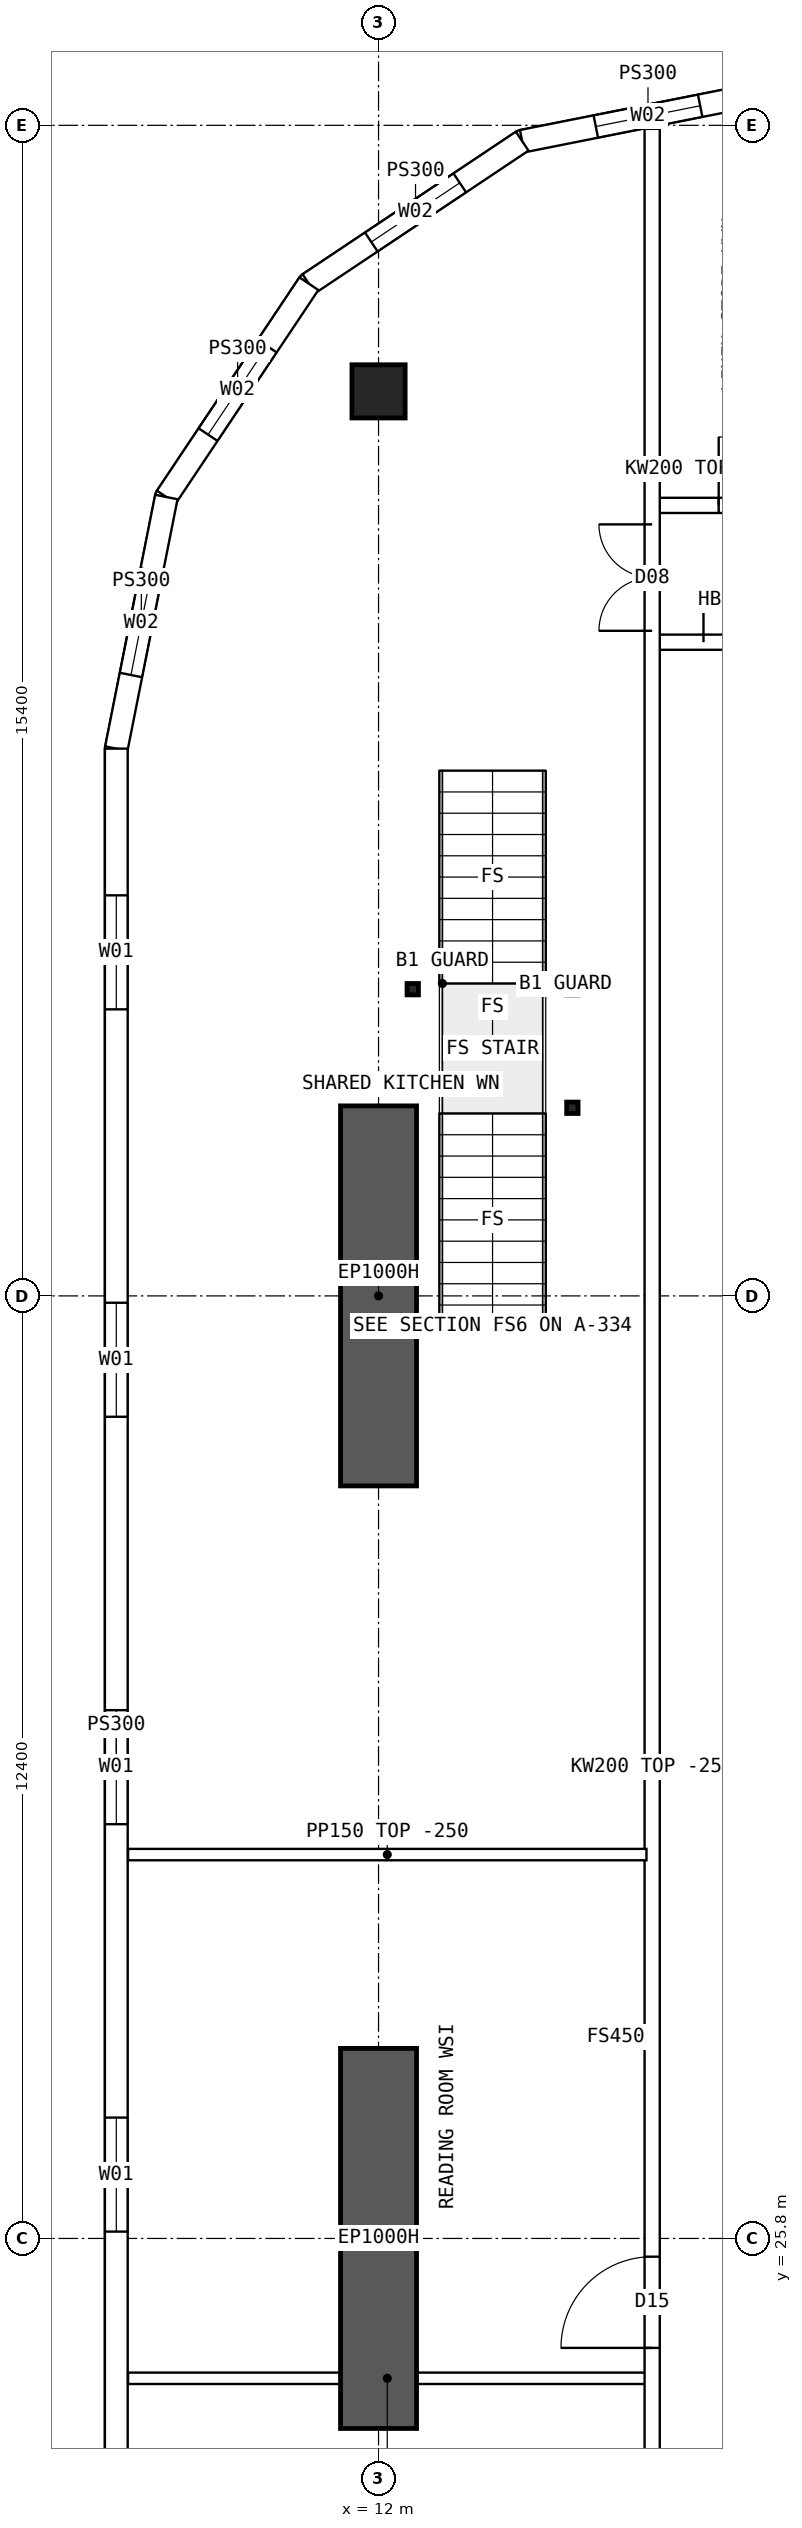
"""IFC4 building model, lengths in metres.
Left out: names, types, materials, properties, quantities, classifications, styles, units other than length and angle.
Written with IfcOpenShell. Run it as: python <this file> out.ifc"""

import sys

from ifc_helpers import new_model, si_unit, direction, frame, frame_2d, origin, origin_2d, place, context, subcontext, project, spatial, polyline, rectangle, hollow_rectangle, outline, extrude, element, fill, save


model = new_model("IFC4")
c1 = context("Model", 3, precision=1e-05, world=origin(), true_north=direction((0.0, 1.0)))
c2 = subcontext(c1, "Body", "Model", "MODEL_VIEW")
j1 = project(units=[si_unit("LENGTHUNIT", "METRE"), si_unit("PLANEANGLEUNIT", "RADIAN")], contexts=[c1])
p1 = place(None, origin())
s1 = spatial("IfcSite", under=j1, at=p1, CompositionType="ELEMENT")
p2 = place(p1, origin())
s2 = spatial("IfcBuilding", under=s1, at=p2, CompositionType="ELEMENT")
p3 = place(p2, frame((0.0, 0.0, 163.6)))
s3 = spatial("IfcBuildingStorey", under=s2, at=p3, CompositionType="ELEMENT", Elevation=163.6)
p4 = place(p3, frame((12.0, 50.1, 0.0), z_axis=(0.0, 0.0, 1.0), x_axis=(1.0, 0.0, 0.0)))
e1 = element("IfcColumn", 1, at=p4, inside=s3, PredefinedType="COLUMN", context=c2, shape_type="SweptSolid", body=[
    extrude(hollow_rectangle(XDim=0.7, YDim=0.7, WallThickness=0.07, at=origin_2d()), origin(), (0.0, 0.0, 1.0), 3.75),
])
for number, where, z_axis, x_axis in (
    (2, (12.0, 23.3, 0.0), (0.0, 0.0, 1.0), (0.0, 1.0, 0.0)),
    (3, (12.0, 35.7, 0.0), (0.0, 0.0, 1.0), (0.0, 1.0, 0.0)),
):
    element("IfcWall", number, at=place(p3, frame(where, z_axis=z_axis, x_axis=x_axis)), inside=s3, PredefinedType="SHEAR", context=c2, shape_type="SweptSolid", body=[
        extrude(rectangle(XDim=5.0, YDim=1.0, at=frame_2d((2.5, 0.0))), origin(), (0.0, 0.0, 1.0), 3.75),
    ])
p5 = place(p3, frame((8.55, 45.4, 0.0), z_axis=(0.0, 0.0, 1.0), x_axis=(0.0, -1.0, 0.0)))
e4 = element("IfcWall", 4, at=p5, inside=s3, PredefinedType="SOLIDWALL", context=c2, shape_type="SweptSolid", body=[
    extrude(outline(polyline([(-0.015, -0.15), (26.815, -0.15), (26.785, 0.15), (0.015, 0.15), (-0.015, -0.15)])), origin(), (0.0, 0.0, 1.0), 3.5),
])
p6 = place(p5, frame((1.93, 0.0, 0.9)))
e5 = element("IfcOpeningElement", 5, at=p6, cuts=e4, PredefinedType="OPENING", context=c2, shape_type="SweptSolid", body=[
    extrude(rectangle(XDim=1.5, YDim=2.0, at=frame_2d((0.75, 1.0))), frame((0.0, 0.16, 0.0), z_axis=(0.0, -1.0, 0.0), x_axis=(1.0, 0.0, 0.0)), (0.0, 0.0, 1.0), 0.32),
])
p7 = place(p5, frame((7.29, 0.0, 0.9)))
e6 = element("IfcOpeningElement", 6, at=p7, cuts=e4, PredefinedType="OPENING", context=c2, shape_type="SweptSolid", body=[
    extrude(rectangle(XDim=1.5, YDim=2.0, at=frame_2d((0.75, 1.0))), frame((0.0, 0.16, 0.0), z_axis=(0.0, -1.0, 0.0), x_axis=(1.0, 0.0, 0.0)), (0.0, 0.0, 1.0), 0.32),
])
p8 = place(p5, frame((12.65, 0.0, 0.9)))
e7 = element("IfcOpeningElement", 7, at=p8, cuts=e4, PredefinedType="OPENING", context=c2, shape_type="SweptSolid", body=[
    extrude(rectangle(XDim=1.5, YDim=2.0, at=frame_2d((0.75, 1.0))), frame((0.0, 0.16, 0.0), z_axis=(0.0, -1.0, 0.0), x_axis=(1.0, 0.0, 0.0)), (0.0, 0.0, 1.0), 0.32),
])
p9 = place(p5, frame((18.01, 0.0, 0.9)))
e8 = element("IfcOpeningElement", 8, at=p9, cuts=e4, PredefinedType="OPENING", context=c2, shape_type="SweptSolid", body=[
    extrude(rectangle(XDim=1.5, YDim=2.0, at=frame_2d((0.75, 1.0))), frame((0.0, 0.16, 0.0), z_axis=(0.0, -1.0, 0.0), x_axis=(1.0, 0.0, 0.0)), (0.0, 0.0, 1.0), 0.32),
])
p10 = place(p5, frame((23.37, 0.0, 0.9)))
e9 = element("IfcOpeningElement", 9, at=p10, cuts=e4, PredefinedType="OPENING", context=c2, shape_type="SweptSolid", body=[
    extrude(rectangle(XDim=1.5, YDim=2.0, at=frame_2d((0.75, 1.0))), frame((0.0, 0.16, 0.0), z_axis=(0.0, -1.0, 0.0), x_axis=(1.0, 0.0, 0.0)), (0.0, 0.0, 1.0), 0.32),
])
p11 = place(p3, frame((17.2, 54.05, 0.0), z_axis=(0.0, 0.0, 1.0), x_axis=(-0.98078325777, -0.195100490205, 0.0)))
e10 = element("IfcWall", 10, at=p11, inside=s3, PredefinedType="SOLIDWALL", context=c2, shape_type="SweptSolid", body=[
    extrude(outline(polyline([(-0.03, -0.15), (3.405, -0.15), (3.345, 0.15), (0.03, 0.15), (-0.03, -0.15)])), origin(), (0.0, 0.0, 1.0), 3.5),
])
p12 = place(p11, frame((0.988, 0.0, 0.9)))
e11 = element("IfcOpeningElement", 11, at=p12, cuts=e10, PredefinedType="OPENING", context=c2, shape_type="SweptSolid", body=[
    extrude(rectangle(XDim=1.4, YDim=1.8, at=frame_2d((0.7, 0.9))), frame((0.0, 0.16, 0.0), z_axis=(0.0, -1.0, 0.0), x_axis=(1.0, 0.0, 0.0)), (0.0, 0.0, 1.0), 0.32),
])
p13 = place(p3, frame((13.89, 53.392, 0.0), z_axis=(0.0, 0.0, 1.0), x_axis=(-0.831493450887, -0.555534554399, 0.0)))
e12 = element("IfcWall", 12, at=p13, inside=s3, PredefinedType="SOLIDWALL", context=c2, shape_type="SweptSolid", body=[
    extrude(outline(polyline([(-0.03, -0.15), (3.405, -0.15), (3.345, 0.15), (0.03, 0.15), (-0.03, -0.15)])), origin(), (0.0, 0.0, 1.0), 3.5),
])
p14 = place(p13, frame((0.988, 0.0, 0.9)))
e13 = element("IfcOpeningElement", 13, at=p14, cuts=e12, PredefinedType="OPENING", context=c2, shape_type="SweptSolid", body=[
    extrude(rectangle(XDim=1.4, YDim=1.8, at=frame_2d((0.7, 0.9))), frame((0.0, 0.16, 0.0), z_axis=(0.0, -1.0, 0.0), x_axis=(1.0, 0.0, 0.0)), (0.0, 0.0, 1.0), 0.32),
])
p15 = place(p3, frame((11.083, 51.517, 0.0), z_axis=(0.0, 0.0, 1.0), x_axis=(-0.555534554399, -0.831493450887, 0.0)))
e14 = element("IfcWall", 14, at=p15, inside=s3, PredefinedType="SOLIDWALL", context=c2, shape_type="SweptSolid", body=[
    extrude(outline(polyline([(-0.03, -0.15), (3.405, -0.15), (3.345, 0.15), (0.03, 0.15), (-0.03, -0.15)])), origin(), (0.0, 0.0, 1.0), 3.5),
])
p16 = place(p15, frame((0.988, 0.0, 0.9)))
e15 = element("IfcOpeningElement", 15, at=p16, cuts=e14, PredefinedType="OPENING", context=c2, shape_type="SweptSolid", body=[
    extrude(rectangle(XDim=1.4, YDim=1.8, at=frame_2d((0.7, 0.9))), frame((0.0, 0.16, 0.0), z_axis=(0.0, -1.0, 0.0), x_axis=(1.0, 0.0, 0.0)), (0.0, 0.0, 1.0), 0.32),
])
p17 = place(p3, frame((9.208, 48.71, 0.0), z_axis=(0.0, 0.0, 1.0), x_axis=(-0.19508664885, -0.980786011034, 0.0)))
e16 = element("IfcWall", 16, at=p17, inside=s3, PredefinedType="SOLIDWALL", context=c2, shape_type="SweptSolid", body=[
    extrude(outline(polyline([(-0.03, -0.15), (3.39, -0.15), (3.36, 0.15), (0.03, 0.15), (-0.03, -0.15)])), origin(), (0.0, 0.0, 1.0), 3.5),
])
p18 = place(p17, frame((0.988, 0.0, 0.9)))
e17 = element("IfcOpeningElement", 17, at=p18, cuts=e16, PredefinedType="OPENING", context=c2, shape_type="SweptSolid", body=[
    extrude(rectangle(XDim=1.4, YDim=1.8, at=frame_2d((0.7, 0.9))), frame((0.0, 0.16, 0.0), z_axis=(0.0, -1.0, 0.0), x_axis=(1.0, 0.0, 0.0)), (0.0, 0.0, 1.0), 0.32),
])
p19 = place(p3, frame((15.6, 48.6, 0.0), z_axis=(0.0, 0.0, 1.0), x_axis=(1.0, 0.0, 0.0)))
e18 = element("IfcWall", 18, at=p19, inside=s3, PredefinedType="SOLIDWALL", context=c2, shape_type="SweptSolid", body=[
    extrude(rectangle(XDim=1.975, YDim=0.2, at=frame_2d((0.987, 0.0))), origin(), (0.0, 0.0, 1.0), 3.5),
])
p20 = place(p19, frame((0.875, 0.0, 0.0)))
e19 = element("IfcOpeningElement", 19, at=p20, cuts=e18, PredefinedType="OPENING", context=c2, shape_type="SweptSolid", body=[
    extrude(rectangle(XDim=0.9, YDim=2.1, at=frame_2d((0.45, 1.05))), frame((0.0, 0.11, 0.0), z_axis=(0.0, -1.0, 0.0), x_axis=(1.0, 0.0, 0.0)), (0.0, 0.0, 1.0), 0.22),
])
p21 = place(p3, frame((15.6, 46.8, 0.0), z_axis=(0.0, 0.0, 1.0), x_axis=(1.0, 0.0, 0.0)))
e20 = element("IfcWall", 20, at=p21, inside=s3, PredefinedType="SOLIDWALL", context=c2, shape_type="SweptSolid", body=[
    extrude(rectangle(XDim=1.975, YDim=0.2, at=frame_2d((0.987, 0.0))), origin(), (0.0, 0.0, 1.0), 3.5),
])
p22 = place(p21, frame((0.675, 0.0, 0.0)))
e21 = element("IfcOpeningElement", 21, at=p22, cuts=e20, PredefinedType="OPENING", context=c2, shape_type="SweptSolid", body=[
    extrude(rectangle(XDim=1.2, YDim=2.1, at=frame_2d((0.6, 1.05))), frame((0.0, 0.11, 0.0), z_axis=(0.0, -1.0, 0.0), x_axis=(1.0, 0.0, 0.0)), (0.0, 0.0, 1.0), 0.22),
])
p23 = place(p3, frame((8.705, 30.85, 0.0), z_axis=(0.0, 0.0, 1.0), x_axis=(1.0, 0.0, 0.0)))
e22 = element("IfcWall", 22, at=p23, inside=s3, PredefinedType="PARTITIONING", context=c2, shape_type="SweptSolid", body=[
    extrude(outline(polyline([(0.0, 0.0), (6.82, 0.0), (6.82, 3.5), (3.597, 3.5), (3.595, 3.05), (2.997, 3.05), (2.995, 3.5), (0.0, 3.5), (0.0, 0.0)])), frame((0.0, 0.075, 0.0), z_axis=(0.0, -1.0, 0.0), x_axis=(1.0, 0.0, 0.0)), (0.0, 0.0, 1.0), 0.15),
])
p24 = place(p3, frame((15.6, 10.446, 0.0), z_axis=(0.0, 0.0, 1.0), x_axis=(0.0, 1.0, 0.0)))
e23 = element("IfcWall", 23, at=p24, inside=s3, PredefinedType="SOLIDWALL", context=c2, shape_type="SweptSolid", body=[
    extrude(rectangle(XDim=43.107, YDim=0.2, at=frame_2d((21.554, 0.0))), origin(), (0.0, 0.0, 1.0), 3.5),
])
p25 = place(p24, frame((13.914, 0.0, 0.0)))
e24 = element("IfcOpeningElement", 24, at=p25, cuts=e23, PredefinedType="OPENING", context=c2, shape_type="SweptSolid", body=[
    extrude(rectangle(XDim=1.2, YDim=2.1, at=frame_2d((0.6, 1.05))), frame((0.0, 0.11, 0.0), z_axis=(0.0, -1.0, 0.0), x_axis=(1.0, 0.0, 0.0)), (0.0, 0.0, 1.0), 0.22),
])
p26 = place(p24, frame((5.104, 0.0, 0.0)))
e25 = element("IfcOpeningElement", 25, at=p26, cuts=e23, PredefinedType="OPENING", context=c2, shape_type="SweptSolid", body=[
    extrude(rectangle(XDim=1.4, YDim=2.1, at=frame_2d((0.7, 1.05))), frame((0.0, 0.11, 0.0), z_axis=(0.0, -1.0, 0.0), x_axis=(1.0, 0.0, 0.0)), (0.0, 0.0, 1.0), 0.22),
])
p27 = place(p24, frame((36.504, 0.0, 0.0)))
e26 = element("IfcOpeningElement", 26, at=p27, cuts=e23, PredefinedType="OPENING", context=c2, shape_type="SweptSolid", body=[
    extrude(rectangle(XDim=1.4, YDim=2.1, at=frame_2d((0.7, 1.05))), frame((0.0, 0.11, 0.0), z_axis=(0.0, -1.0, 0.0), x_axis=(1.0, 0.0, 0.0)), (0.0, 0.0, 1.0), 0.22),
])
p28 = place(p3, frame((8.705, 23.96, 0.0), z_axis=(0.0, 0.0, 1.0), x_axis=(1.0, 0.0, 0.0)))
e27 = element("IfcWall", 27, at=p28, inside=s3, PredefinedType="PARTITIONING", context=c2, shape_type="SweptSolid", body=[
    extrude(rectangle(XDim=6.82, YDim=0.15, at=frame_2d((3.41, 0.0))), origin(), (0.0, 0.0, 1.0), 3.5),
])
for number, where, z_axis, x_axis in (
    (28, (14.55, 40.675, 0.0), (0.0, 0.0, 1.0), (1.0, 0.0, 0.0)),
    (29, (12.45, 42.235, 0.0), (0.0, 0.0, 1.0), (1.0, 0.0, 0.0)),
    (30, (14.55, 42.235, 0.0), (0.0, 0.0, 1.0), (1.0, 0.0, 0.0)),
):
    element("IfcColumn", number, at=place(p3, frame(where, z_axis=z_axis, x_axis=x_axis)), inside=s3, PredefinedType="COLUMN", context=c2, shape_type="SweptSolid", body=[
        extrude(hollow_rectangle(XDim=0.15, YDim=0.15, WallThickness=0.008, at=origin_2d()), origin(), (0.0, 0.0, 1.0), 3.5),
    ])
p29 = place(p6, origin())
e31 = element("IfcWindow", 31, at=p29, inside=s3, PartitioningType="SINGLE_PANEL", PredefinedType="WINDOW", context=c2, shape_type="SweptSolid", body=[
    extrude(rectangle(XDim=1.5, YDim=2.0, at=frame_2d((0.75, 1.0))), frame((0.0, 0.03, 0.0), z_axis=(0.0, -1.0, 0.0), x_axis=(1.0, 0.0, 0.0)), (0.0, 0.0, 1.0), 0.06),
])
fill(e5, e31)
p30 = place(p7, origin())
e32 = element("IfcWindow", 32, at=p30, inside=s3, PartitioningType="SINGLE_PANEL", PredefinedType="WINDOW", context=c2, shape_type="SweptSolid", body=[
    extrude(rectangle(XDim=1.5, YDim=2.0, at=frame_2d((0.75, 1.0))), frame((0.0, 0.03, 0.0), z_axis=(0.0, -1.0, 0.0), x_axis=(1.0, 0.0, 0.0)), (0.0, 0.0, 1.0), 0.06),
])
fill(e6, e32)
p31 = place(p8, origin())
e33 = element("IfcWindow", 33, at=p31, inside=s3, PartitioningType="SINGLE_PANEL", PredefinedType="WINDOW", context=c2, shape_type="SweptSolid", body=[
    extrude(rectangle(XDim=1.5, YDim=2.0, at=frame_2d((0.75, 1.0))), frame((0.0, 0.03, 0.0), z_axis=(0.0, -1.0, 0.0), x_axis=(1.0, 0.0, 0.0)), (0.0, 0.0, 1.0), 0.06),
])
fill(e7, e33)
p32 = place(p9, origin())
e34 = element("IfcWindow", 34, at=p32, inside=s3, PartitioningType="SINGLE_PANEL", PredefinedType="WINDOW", context=c2, shape_type="SweptSolid", body=[
    extrude(rectangle(XDim=1.5, YDim=2.0, at=frame_2d((0.75, 1.0))), frame((0.0, 0.03, 0.0), z_axis=(0.0, -1.0, 0.0), x_axis=(1.0, 0.0, 0.0)), (0.0, 0.0, 1.0), 0.06),
])
fill(e8, e34)
p33 = place(p12, origin())
e35 = element("IfcWindow", 35, at=p33, inside=s3, PartitioningType="SINGLE_PANEL", PredefinedType="WINDOW", context=c2, shape_type="SweptSolid", body=[
    extrude(rectangle(XDim=1.4, YDim=1.8, at=frame_2d((0.7, 0.9))), frame((0.0, 0.03, 0.0), z_axis=(0.0, -1.0, 0.0), x_axis=(1.0, 0.0, 0.0)), (0.0, 0.0, 1.0), 0.06),
])
fill(e11, e35)
p34 = place(p14, origin())
e36 = element("IfcWindow", 36, at=p34, inside=s3, PartitioningType="SINGLE_PANEL", PredefinedType="WINDOW", context=c2, shape_type="SweptSolid", body=[
    extrude(rectangle(XDim=1.4, YDim=1.8, at=frame_2d((0.7, 0.9))), frame((0.0, 0.03, 0.0), z_axis=(0.0, -1.0, 0.0), x_axis=(1.0, 0.0, 0.0)), (0.0, 0.0, 1.0), 0.06),
])
fill(e13, e36)
p35 = place(p16, origin())
e37 = element("IfcWindow", 37, at=p35, inside=s3, PartitioningType="SINGLE_PANEL", PredefinedType="WINDOW", context=c2, shape_type="SweptSolid", body=[
    extrude(rectangle(XDim=1.4, YDim=1.8, at=frame_2d((0.7, 0.9))), frame((0.0, 0.03, 0.0), z_axis=(0.0, -1.0, 0.0), x_axis=(1.0, 0.0, 0.0)), (0.0, 0.0, 1.0), 0.06),
])
fill(e15, e37)
p36 = place(p18, origin())
e38 = element("IfcWindow", 38, at=p36, inside=s3, PartitioningType="SINGLE_PANEL", PredefinedType="WINDOW", context=c2, shape_type="SweptSolid", body=[
    extrude(rectangle(XDim=1.4, YDim=1.8, at=frame_2d((0.7, 0.9))), frame((0.0, 0.03, 0.0), z_axis=(0.0, -1.0, 0.0), x_axis=(1.0, 0.0, 0.0)), (0.0, 0.0, 1.0), 0.06),
])
fill(e17, e38)
p37 = place(p22, origin())
e39 = element("IfcDoor", 39, at=p37, inside=s3, OperationType="DOUBLE_DOOR_SINGLE_SWING", PredefinedType="DOOR", context=c2, shape_type="SweptSolid", body=[
    extrude(rectangle(XDim=1.2, YDim=2.1, at=frame_2d((0.6, 1.05))), frame((0.0, 0.025, 0.0), z_axis=(0.0, -1.0, 0.0), x_axis=(1.0, 0.0, 0.0)), (0.0, 0.0, 1.0), 0.05),
])
fill(e21, e39)
p38 = place(p25, origin())
e40 = element("IfcDoor", 40, at=p38, inside=s3, OperationType="SINGLE_SWING_LEFT", PredefinedType="DOOR", context=c2, shape_type="SweptSolid", body=[
    extrude(rectangle(XDim=1.2, YDim=2.1, at=frame_2d((0.6, 1.05))), frame((0.0, 0.025, 0.0), z_axis=(0.0, -1.0, 0.0), x_axis=(1.0, 0.0, 0.0)), (0.0, 0.0, 1.0), 0.05),
])
fill(e24, e40)
p39 = place(p27, origin())
e41 = element("IfcDoor", 41, at=p39, inside=s3, OperationType="DOUBLE_DOOR_SINGLE_SWING", PredefinedType="DOOR", context=c2, shape_type="SweptSolid", body=[
    extrude(rectangle(XDim=1.4, YDim=2.1, at=frame_2d((0.7, 1.05))), frame((0.0, 0.025, 0.0), z_axis=(0.0, -1.0, 0.0), x_axis=(1.0, 0.0, 0.0)), (0.0, 0.0, 1.0), 0.05),
])
fill(e26, e41)
p40 = place(p20, origin())
e42 = element("IfcDoor", 42, at=p40, inside=s3, OperationType="SINGLE_SWING_LEFT", PredefinedType="DOOR", context=c2, shape_type="SweptSolid", body=[
    extrude(rectangle(XDim=0.9, YDim=2.1, at=frame_2d((0.45, 1.05))), frame((0.0, 0.025, 0.0), z_axis=(0.0, -1.0, 0.0), x_axis=(1.0, 0.0, 0.0)), (0.0, 0.0, 1.0), 0.05),
])
fill(e19, e42)
save(model, sys.argv[1])
